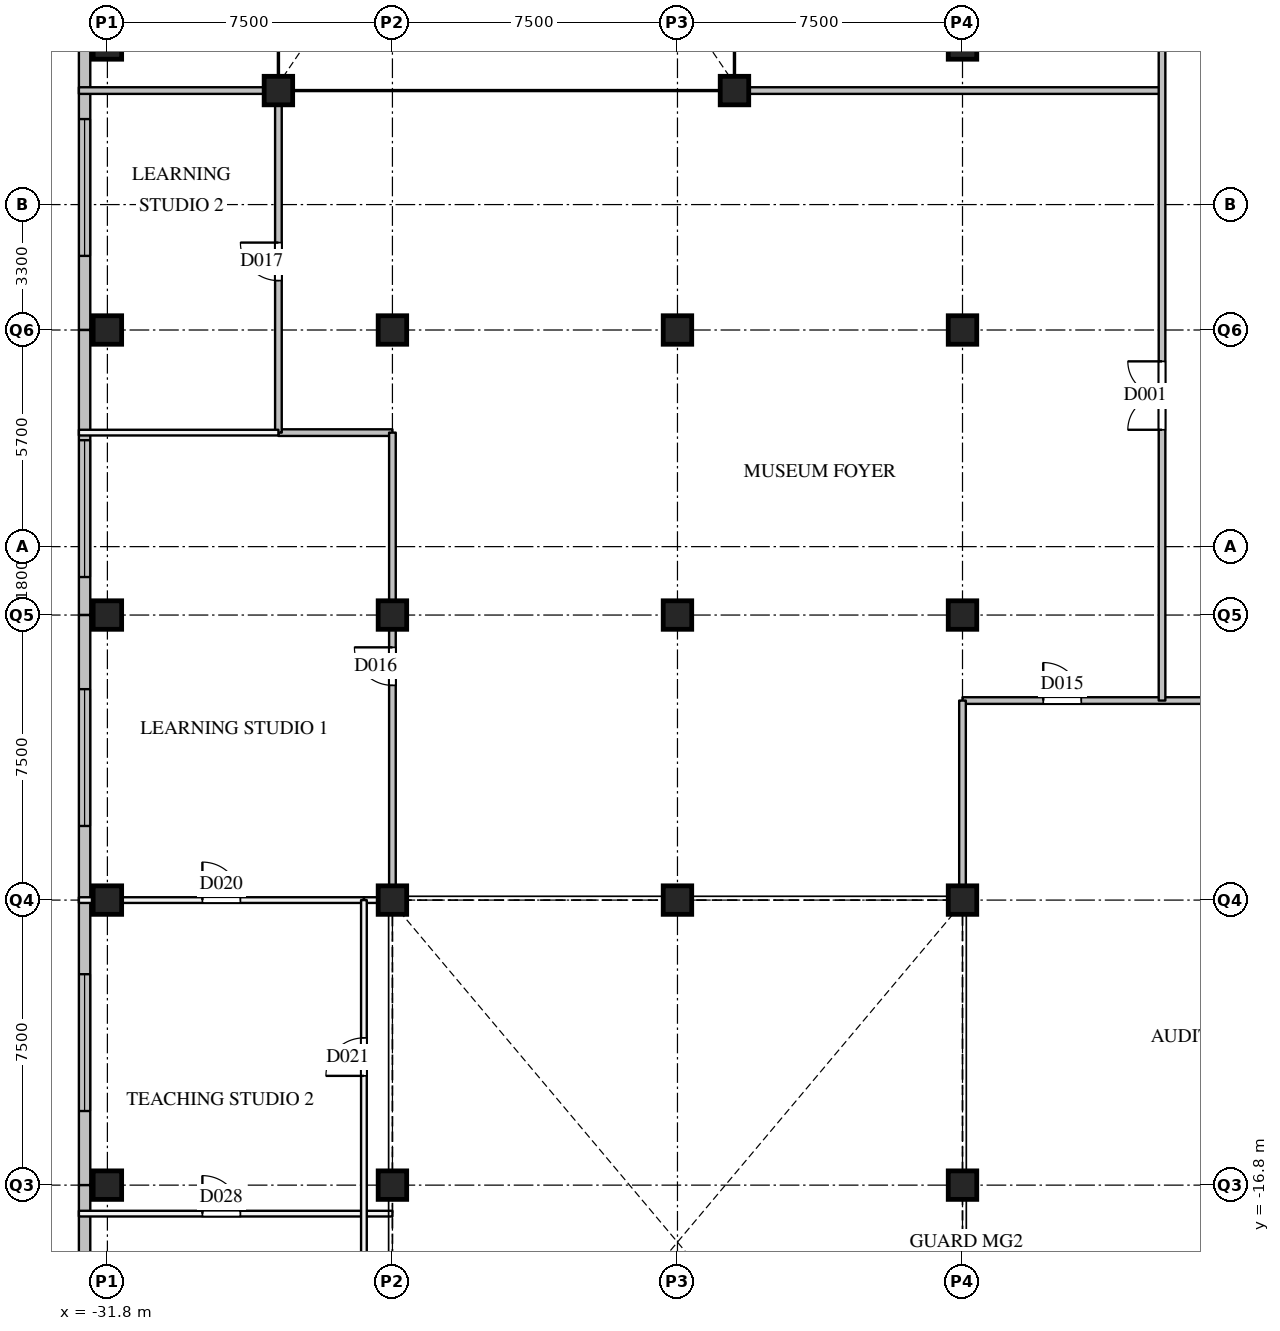
"""IFC4 building model, lengths in metres.
Left out: names, types, materials, properties, quantities, classifications, styles, units other than length and angle.
Written with IfcOpenShell. Run it as: python <this file> out.ifc"""

import sys

from ifc_helpers import new_model, si_unit, direction, frame, frame_2d, origin, origin_2d, place, context, subcontext, project, spatial, rectangle, extrude, element, fill, save


model = new_model("IFC4")
c1 = context("Model", 3, precision=1e-05, world=origin(), true_north=direction((0.0, 1.0)))
c2 = subcontext(c1, "Body", "Model", "MODEL_VIEW")
j1 = project(units=[si_unit("LENGTHUNIT", "METRE"), si_unit("PLANEANGLEUNIT", "RADIAN")], contexts=[c1])
p1 = place(None, origin())
s1 = spatial("IfcSite", under=j1, at=p1, CompositionType="ELEMENT")
p2 = place(p1, origin())
s2 = spatial("IfcBuilding", under=s1, at=p2, CompositionType="ELEMENT")
p3 = place(p2, frame((0.0, 0.0, 8.0)))
s3 = spatial("IfcBuildingStorey", under=s2, at=p3, CompositionType="ELEMENT", Elevation=8.0)
for number, where, z_axis, x_axis in (
    (1, (-31.8, -16.8, 0.0), (0.0, 0.0, 1.0), (1.0, 0.0, 0.0)),
    (2, (-31.8, -9.3, 0.0), (0.0, 0.0, 1.0), (1.0, 0.0, 0.0)),
    (3, (-31.8, -1.8, 0.0), (0.0, 0.0, 1.0), (1.0, 0.0, 0.0)),
    (4, (-31.8, 5.7, 0.0), (0.0, 0.0, 1.0), (1.0, 0.0, 0.0)),
    (5, (-31.8, 13.2, 0.0), (0.0, 0.0, 1.0), (1.0, 0.0, 0.0)),
    (6, (-24.3, -16.8, 0.0), (0.0, 0.0, 1.0), (1.0, 0.0, 0.0)),
    (7, (-24.3, -9.3, 0.0), (0.0, 0.0, 1.0), (1.0, 0.0, 0.0)),
    (8, (-24.3, -1.8, 0.0), (0.0, 0.0, 1.0), (1.0, 0.0, 0.0)),
    (9, (-24.3, 5.7, 0.0), (0.0, 0.0, 1.0), (1.0, 0.0, 0.0)),
    (10, (-16.8, -9.3, 0.0), (0.0, 0.0, 1.0), (1.0, 0.0, 0.0)),
    (11, (-16.8, -1.8, 0.0), (0.0, 0.0, 1.0), (1.0, 0.0, 0.0)),
    (12, (-16.8, 5.7, 0.0), (0.0, 0.0, 1.0), (1.0, 0.0, 0.0)),
    (13, (-9.3, -16.8, 0.0), (0.0, 0.0, 1.0), (1.0, 0.0, 0.0)),
    (14, (-9.3, -9.3, 0.0), (0.0, 0.0, 1.0), (1.0, 0.0, 0.0)),
    (15, (-9.3, -1.8, 0.0), (0.0, 0.0, 1.0), (1.0, 0.0, 0.0)),
    (16, (-9.3, 5.7, 0.0), (0.0, 0.0, 1.0), (1.0, 0.0, 0.0)),
    (17, (-9.3, 13.2, 0.0), (0.0, 0.0, 1.0), (1.0, 0.0, 0.0)),
    (18, (-27.3, 12.0, 0.0), (0.0, 0.0, 1.0), (1.0, 0.0, 0.0)),
    (19, (-15.3, 12.0, 0.0), (0.0, 0.0, 1.0), (1.0, 0.0, 0.0)),
):
    element("IfcColumn", number, at=place(p3, frame(where, z_axis=z_axis, x_axis=x_axis)), inside=s3, PredefinedType="COLUMN", context=c2, shape_type="SweptSolid", body=[
        extrude(rectangle(XDim=0.75, YDim=0.75, at=origin_2d()), origin(), (0.0, 0.0, 1.0), 6.0),
    ])
p4 = place(p3, frame((-32.4, 13.2, 0.0), z_axis=(0.0, 0.0, 1.0), x_axis=(0.0, -1.0, 0.0)))
e20 = element("IfcWall", 20, at=p4, inside=s3, PredefinedType="SOLIDWALL", context=c2, shape_type="SweptSolid", body=[
    extrude(rectangle(XDim=7.5, YDim=0.3, at=frame_2d((3.75, 0.0))), origin(), (0.0, 0.0, 1.0), 5.59),
])
p5 = place(p4, frame((1.95, 0.0, 2.4)))
e21 = element("IfcOpeningElement", 21, at=p5, cuts=e20, PredefinedType="OPENING", context=c2, shape_type="SweptSolid", body=[
    extrude(rectangle(XDim=3.6, YDim=1.2, at=frame_2d((1.8, 0.6))), frame((0.0, 0.16, 0.0), z_axis=(0.0, -1.0, 0.0), x_axis=(1.0, 0.0, 0.0)), (0.0, 0.0, 1.0), 0.32),
])
p6 = place(p3, frame((-32.4, 5.7, 0.0), z_axis=(0.0, 0.0, 1.0), x_axis=(0.0, -1.0, 0.0)))
e22 = element("IfcWall", 22, at=p6, inside=s3, PredefinedType="SOLIDWALL", context=c2, shape_type="SweptSolid", body=[
    extrude(rectangle(XDim=7.5, YDim=0.3, at=frame_2d((3.75, 0.0))), origin(), (0.0, 0.0, 1.0), 5.59),
])
p7 = place(p6, frame((2.9, 0.0, 2.4)))
e23 = element("IfcOpeningElement", 23, at=p7, cuts=e22, PredefinedType="OPENING", context=c2, shape_type="SweptSolid", body=[
    extrude(rectangle(XDim=3.6, YDim=1.2, at=frame_2d((1.8, 0.6))), frame((0.0, 0.16, 0.0), z_axis=(0.0, -1.0, 0.0), x_axis=(1.0, 0.0, 0.0)), (0.0, 0.0, 1.0), 0.32),
])
p8 = place(p3, frame((-32.4, -1.8, 0.0), z_axis=(0.0, 0.0, 1.0), x_axis=(0.0, -1.0, 0.0)))
e24 = element("IfcWall", 24, at=p8, inside=s3, PredefinedType="SOLIDWALL", context=c2, shape_type="SweptSolid", body=[
    extrude(rectangle(XDim=7.5, YDim=0.3, at=frame_2d((3.75, 0.0))), origin(), (0.0, 0.0, 1.0), 5.59),
])
p9 = place(p8, frame((1.95, 0.0, 2.4)))
e25 = element("IfcOpeningElement", 25, at=p9, cuts=e24, PredefinedType="OPENING", context=c2, shape_type="SweptSolid", body=[
    extrude(rectangle(XDim=3.6, YDim=1.2, at=frame_2d((1.8, 0.6))), frame((0.0, 0.16, 0.0), z_axis=(0.0, -1.0, 0.0), x_axis=(1.0, 0.0, 0.0)), (0.0, 0.0, 1.0), 0.32),
])
p10 = place(p3, frame((-32.4, -9.3, 0.0), z_axis=(0.0, 0.0, 1.0), x_axis=(0.0, -1.0, 0.0)))
e26 = element("IfcWall", 26, at=p10, inside=s3, PredefinedType="SOLIDWALL", context=c2, shape_type="SweptSolid", body=[
    extrude(rectangle(XDim=7.5, YDim=0.3, at=frame_2d((3.75, 0.0))), origin(), (0.0, 0.0, 1.0), 5.59),
])
p11 = place(p10, frame((1.95, 0.0, 2.4)))
e27 = element("IfcOpeningElement", 27, at=p11, cuts=e26, PredefinedType="OPENING", context=c2, shape_type="SweptSolid", body=[
    extrude(rectangle(XDim=3.6, YDim=1.2, at=frame_2d((1.8, 0.6))), frame((0.0, 0.16, 0.0), z_axis=(0.0, -1.0, 0.0), x_axis=(1.0, 0.0, 0.0)), (0.0, 0.0, 1.0), 0.32),
])
p12 = place(p3, frame((-32.4, -16.8, 0.0), z_axis=(0.0, 0.0, 1.0), x_axis=(0.0, -1.0, 0.0)))
e28 = element("IfcWall", 28, at=p12, inside=s3, PredefinedType="SOLIDWALL", context=c2, shape_type="SweptSolid", body=[
    extrude(rectangle(XDim=4.15, YDim=0.3, at=frame_2d((2.075, 0.0))), origin(), (0.0, 0.0, 1.0), 5.59),
])
p13 = place(p3, frame((-9.3, -4.05, 0.0), z_axis=(0.0, 0.0, 1.0), x_axis=(1.0, 0.0, 0.0)))
e29 = element("IfcWall", 29, at=p13, inside=s3, PredefinedType="PARTITIONING", context=c2, shape_type="SweptSolid", body=[
    extrude(rectangle(XDim=23.25, YDim=0.175, at=frame_2d((11.625, 0.0))), origin(), (0.0, 0.0, 1.0), 4.79),
])
p14 = place(p13, frame((17.375, 0.0, 0.0)))
e30 = element("IfcOpeningElement", 30, at=p14, cuts=e29, PredefinedType="OPENING", context=c2, shape_type="SweptSolid", body=[
    extrude(rectangle(XDim=1.8, YDim=2.1, at=frame_2d((0.9, 1.05))), frame((0.0, 0.097, 0.0), z_axis=(0.0, -1.0, 0.0), x_axis=(1.0, 0.0, 0.0)), (0.0, 0.0, 1.0), 0.195),
])
p15 = place(p13, frame((2.125, 0.0, 0.0)))
e31 = element("IfcOpeningElement", 31, at=p15, cuts=e29, PredefinedType="OPENING", context=c2, shape_type="SweptSolid", body=[
    extrude(rectangle(XDim=1.0, YDim=2.1, at=frame_2d((0.5, 1.05))), frame((0.0, 0.097, 0.0), z_axis=(0.0, -1.0, 0.0), x_axis=(1.0, 0.0, 0.0)), (0.0, 0.0, 1.0), 0.195),
])
p16 = place(p3, frame((-27.3, 3.0, 0.0), z_axis=(0.0, 0.0, 1.0), x_axis=(1.0, 0.0, 0.0)))
e32 = element("IfcWall", 32, at=p16, inside=s3, PredefinedType="PARTITIONING", context=c2, shape_type="SweptSolid", body=[
    extrude(rectangle(XDim=3.0, YDim=0.175, at=frame_2d((1.5, 0.0))), origin(), (0.0, 0.0, 1.0), 4.79),
])
p17 = place(p3, frame((-32.55, 12.0, 0.0), z_axis=(0.0, 0.0, 1.0), x_axis=(1.0, 0.0, 0.0)))
e33 = element("IfcWall", 33, at=p17, inside=s3, PredefinedType="PARTITIONING", context=c2, shape_type="SweptSolid", body=[
    extrude(rectangle(XDim=5.25, YDim=0.175, at=frame_2d((2.625, 0.0))), origin(), (0.0, 0.0, 1.0), 4.79),
])
p18 = place(p3, frame((-15.3, 12.0, 0.0), z_axis=(0.0, 0.0, 1.0), x_axis=(1.0, 0.0, 0.0)))
e34 = element("IfcWall", 34, at=p18, inside=s3, PredefinedType="PARTITIONING", context=c2, shape_type="SweptSolid", body=[
    extrude(rectangle(XDim=11.25, YDim=0.175, at=frame_2d((5.625, 0.0))), origin(), (0.0, 0.0, 1.0), 4.79),
])
p19 = place(p3, frame((-27.3, 3.0, 0.0), z_axis=(0.0, 0.0, 1.0), x_axis=(0.0, 1.0, 0.0)))
e35 = element("IfcWall", 35, at=p19, inside=s3, PredefinedType="PARTITIONING", context=c2, shape_type="SweptSolid", body=[
    extrude(rectangle(XDim=9.0, YDim=0.175, at=frame_2d((4.5, 0.0))), origin(), (0.0, 0.0, 1.0), 4.79),
])
p20 = place(p19, frame((4.0, 0.0, 0.0)))
e36 = element("IfcOpeningElement", 36, at=p20, cuts=e35, PredefinedType="OPENING", context=c2, shape_type="SweptSolid", body=[
    extrude(rectangle(XDim=1.0, YDim=2.1, at=frame_2d((0.5, 1.05))), frame((0.0, 0.097, 0.0), z_axis=(0.0, -1.0, 0.0), x_axis=(1.0, 0.0, 0.0)), (0.0, 0.0, 1.0), 0.195),
])
p21 = place(p3, frame((-24.3, -9.3, 0.0), z_axis=(0.0, 0.0, 1.0), x_axis=(0.0, 1.0, 0.0)))
e37 = element("IfcWall", 37, at=p21, inside=s3, PredefinedType="PARTITIONING", context=c2, shape_type="SweptSolid", body=[
    extrude(rectangle(XDim=12.3, YDim=0.175, at=frame_2d((6.15, 0.0))), origin(), (0.0, 0.0, 1.0), 4.79),
])
p22 = place(p21, frame((5.65, 0.0, 0.0)))
e38 = element("IfcOpeningElement", 38, at=p22, cuts=e37, PredefinedType="OPENING", context=c2, shape_type="SweptSolid", body=[
    extrude(rectangle(XDim=1.0, YDim=2.1, at=frame_2d((0.5, 1.05))), frame((0.0, 0.097, 0.0), z_axis=(0.0, -1.0, 0.0), x_axis=(1.0, 0.0, 0.0)), (0.0, 0.0, 1.0), 0.195),
])
p23 = place(p3, frame((-9.3, -9.3, 0.0), z_axis=(0.0, 0.0, 1.0), x_axis=(0.0, 1.0, 0.0)))
e39 = element("IfcWall", 39, at=p23, inside=s3, PredefinedType="PARTITIONING", context=c2, shape_type="SweptSolid", body=[
    extrude(rectangle(XDim=5.25, YDim=0.175, at=frame_2d((2.625, 0.0))), origin(), (0.0, 0.0, 1.0), 4.79),
])
p24 = place(p3, frame((-4.05, -4.05, 0.0), z_axis=(0.0, 0.0, 1.0), x_axis=(0.0, 1.0, 0.0)))
e40 = element("IfcWall", 40, at=p24, inside=s3, PredefinedType="PARTITIONING", context=c2, shape_type="SweptSolid", body=[
    extrude(rectangle(XDim=63.0, YDim=0.175, at=frame_2d((31.5, 0.0))), origin(), (0.0, 0.0, 1.0), 4.79),
])
p25 = place(p24, frame((7.125, 0.0, 0.0)))
e41 = element("IfcOpeningElement", 41, at=p25, cuts=e40, PredefinedType="OPENING", context=c2, shape_type="SweptSolid", body=[
    extrude(rectangle(XDim=1.8, YDim=2.1, at=frame_2d((0.9, 1.05))), frame((0.0, 0.097, 0.0), z_axis=(0.0, -1.0, 0.0), x_axis=(1.0, 0.0, 0.0)), (0.0, 0.0, 1.0), 0.195),
])
p26 = place(p24, frame((60.775, 0.0, 0.0)))
e42 = element("IfcOpeningElement", 42, at=p26, cuts=e40, PredefinedType="OPENING", context=c2, shape_type="SweptSolid", body=[
    extrude(rectangle(XDim=1.8, YDim=2.1, at=frame_2d((0.9, 1.05))), frame((0.0, 0.097, 0.0), z_axis=(0.0, -1.0, 0.0), x_axis=(1.0, 0.0, 0.0)), (0.0, 0.0, 1.0), 0.195),
])
p27 = place(p24, frame((22.65, 0.0, 0.0)))
e43 = element("IfcOpeningElement", 43, at=p27, cuts=e40, PredefinedType="OPENING", context=c2, shape_type="SweptSolid", body=[
    extrude(rectangle(XDim=1.8, YDim=2.1, at=frame_2d((0.9, 1.05))), frame((0.0, 0.097, 0.0), z_axis=(0.0, -1.0, 0.0), x_axis=(1.0, 0.0, 0.0)), (0.0, 0.0, 1.0), 0.195),
])
p28 = place(p24, frame((37.65, 0.0, 0.0)))
e44 = element("IfcOpeningElement", 44, at=p28, cuts=e40, PredefinedType="OPENING", context=c2, shape_type="SweptSolid", body=[
    extrude(rectangle(XDim=1.8, YDim=2.1, at=frame_2d((0.9, 1.05))), frame((0.0, 0.097, 0.0), z_axis=(0.0, -1.0, 0.0), x_axis=(1.0, 0.0, 0.0)), (0.0, 0.0, 1.0), 0.195),
])
p29 = place(p24, frame((52.3, 0.0, 0.0)))
e45 = element("IfcOpeningElement", 45, at=p29, cuts=e40, PredefinedType="OPENING", context=c2, shape_type="SweptSolid", body=[
    extrude(rectangle(XDim=1.8, YDim=2.1, at=frame_2d((0.9, 1.05))), frame((0.0, 0.097, 0.0), z_axis=(0.0, -1.0, 0.0), x_axis=(1.0, 0.0, 0.0)), (0.0, 0.0, 1.0), 0.195),
])
for number, where, z_axis, x_axis in (
    (46, (-25.05, -17.55, 0.0), (0.0, 0.0, 1.0), (1.0, 0.0, 0.0)),
    (47, (-25.05, -9.3, 0.0), (0.0, 0.0, 1.0), (1.0, 0.0, 0.0)),
):
    element("IfcWall", number, at=place(p3, frame(where, z_axis=z_axis, x_axis=x_axis)), inside=s3, PredefinedType="PARTITIONING", context=c2, shape_type="SweptSolid", body=[
        extrude(rectangle(XDim=0.75, YDim=0.15, at=frame_2d((0.375, 0.0))), origin(), (0.0, 0.0, 1.0), 4.79),
    ])
p30 = place(p3, frame((-32.55, 3.0, 0.0), z_axis=(0.0, 0.0, 1.0), x_axis=(1.0, 0.0, 0.0)))
e48 = element("IfcWall", 48, at=p30, inside=s3, PredefinedType="PARTITIONING", context=c2, shape_type="SweptSolid", body=[
    extrude(rectangle(XDim=5.25, YDim=0.15, at=frame_2d((2.625, 0.0))), origin(), (0.0, 0.0, 1.0), 4.79),
])
p31 = place(p3, frame((-32.55, -17.55, 0.0), z_axis=(0.0, 0.0, 1.0), x_axis=(1.0, 0.0, 0.0)))
e49 = element("IfcWall", 49, at=p31, inside=s3, PredefinedType="PARTITIONING", context=c2, shape_type="SweptSolid", body=[
    extrude(rectangle(XDim=7.5, YDim=0.15, at=frame_2d((3.75, 0.0))), origin(), (0.0, 0.0, 1.0), 4.79),
])
p32 = place(p31, frame((3.25, 0.0, 0.0)))
e50 = element("IfcOpeningElement", 50, at=p32, cuts=e49, PredefinedType="OPENING", context=c2, shape_type="SweptSolid", body=[
    extrude(rectangle(XDim=1.0, YDim=2.1, at=frame_2d((0.5, 1.05))), frame((0.0, 0.085, 0.0), z_axis=(0.0, -1.0, 0.0), x_axis=(1.0, 0.0, 0.0)), (0.0, 0.0, 1.0), 0.17),
])
p33 = place(p3, frame((-32.55, -9.3, 0.0), z_axis=(0.0, 0.0, 1.0), x_axis=(1.0, 0.0, 0.0)))
e51 = element("IfcWall", 51, at=p33, inside=s3, PredefinedType="PARTITIONING", context=c2, shape_type="SweptSolid", body=[
    extrude(rectangle(XDim=7.5, YDim=0.15, at=frame_2d((3.75, 0.0))), origin(), (0.0, 0.0, 1.0), 4.79),
])
p34 = place(p33, frame((3.25, 0.0, 0.0)))
e52 = element("IfcOpeningElement", 52, at=p34, cuts=e51, PredefinedType="OPENING", context=c2, shape_type="SweptSolid", body=[
    extrude(rectangle(XDim=1.0, YDim=2.1, at=frame_2d((0.5, 1.05))), frame((0.0, 0.085, 0.0), z_axis=(0.0, -1.0, 0.0), x_axis=(1.0, 0.0, 0.0)), (0.0, 0.0, 1.0), 0.17),
])
p35 = place(p3, frame((-25.05, -20.95, 0.0), z_axis=(0.0, 0.0, 1.0), x_axis=(0.0, 1.0, 0.0)))
e53 = element("IfcWall", 53, at=p35, inside=s3, PredefinedType="PARTITIONING", context=c2, shape_type="SweptSolid", body=[
    extrude(rectangle(XDim=11.65, YDim=0.15, at=frame_2d((5.825, 0.0))), origin(), (0.0, 0.0, 1.0), 4.79),
])
p36 = place(p35, frame((7.025, 0.0, 0.0)))
e54 = element("IfcOpeningElement", 54, at=p36, cuts=e53, PredefinedType="OPENING", context=c2, shape_type="SweptSolid", body=[
    extrude(rectangle(XDim=1.0, YDim=2.1, at=frame_2d((0.5, 1.05))), frame((0.0, 0.085, 0.0), z_axis=(0.0, -1.0, 0.0), x_axis=(1.0, 0.0, 0.0)), (0.0, 0.0, 1.0), 0.17),
])
p37 = place(p35, frame((1.2, 0.0, 0.0)))
e55 = element("IfcOpeningElement", 55, at=p37, cuts=e53, PredefinedType="OPENING", context=c2, shape_type="SweptSolid", body=[
    extrude(rectangle(XDim=1.0, YDim=2.1, at=frame_2d((0.5, 1.05))), frame((0.0, 0.085, 0.0), z_axis=(0.0, -1.0, 0.0), x_axis=(1.0, 0.0, 0.0)), (0.0, 0.0, 1.0), 0.17),
])
p38 = place(p5, origin())
e56 = element("IfcWindow", 56, at=p38, inside=s3, PartitioningType="SINGLE_PANEL", PredefinedType="WINDOW", context=c2, shape_type="SweptSolid", body=[
    extrude(rectangle(XDim=3.6, YDim=1.2, at=frame_2d((1.8, 0.6))), frame((0.0, 0.03, 0.0), z_axis=(0.0, -1.0, 0.0), x_axis=(1.0, 0.0, 0.0)), (0.0, 0.0, 1.0), 0.06),
])
fill(e21, e56)
p39 = place(p7, origin())
e57 = element("IfcWindow", 57, at=p39, inside=s3, PartitioningType="SINGLE_PANEL", PredefinedType="WINDOW", context=c2, shape_type="SweptSolid", body=[
    extrude(rectangle(XDim=3.6, YDim=1.2, at=frame_2d((1.8, 0.6))), frame((0.0, 0.03, 0.0), z_axis=(0.0, -1.0, 0.0), x_axis=(1.0, 0.0, 0.0)), (0.0, 0.0, 1.0), 0.06),
])
fill(e23, e57)
p40 = place(p9, origin())
e58 = element("IfcWindow", 58, at=p40, inside=s3, PartitioningType="SINGLE_PANEL", PredefinedType="WINDOW", context=c2, shape_type="SweptSolid", body=[
    extrude(rectangle(XDim=3.6, YDim=1.2, at=frame_2d((1.8, 0.6))), frame((0.0, 0.03, 0.0), z_axis=(0.0, -1.0, 0.0), x_axis=(1.0, 0.0, 0.0)), (0.0, 0.0, 1.0), 0.06),
])
fill(e25, e58)
p41 = place(p11, origin())
e59 = element("IfcWindow", 59, at=p41, inside=s3, PartitioningType="SINGLE_PANEL", PredefinedType="WINDOW", context=c2, shape_type="SweptSolid", body=[
    extrude(rectangle(XDim=3.6, YDim=1.2, at=frame_2d((1.8, 0.6))), frame((0.0, 0.03, 0.0), z_axis=(0.0, -1.0, 0.0), x_axis=(1.0, 0.0, 0.0)), (0.0, 0.0, 1.0), 0.06),
])
fill(e27, e59)
p42 = place(p25, origin())
e60 = element("IfcDoor", 60, at=p42, inside=s3, OperationType="DOUBLE_DOOR_SINGLE_SWING", PredefinedType="DOOR", context=c2, shape_type="SweptSolid", body=[
    extrude(rectangle(XDim=1.8, YDim=2.1, at=frame_2d((0.9, 1.05))), frame((0.0, 0.025, 0.0), z_axis=(0.0, -1.0, 0.0), x_axis=(1.0, 0.0, 0.0)), (0.0, 0.0, 1.0), 0.05),
])
fill(e41, e60)
p43 = place(p15, origin())
e61 = element("IfcDoor", 61, at=p43, inside=s3, OperationType="SINGLE_SWING_LEFT", PredefinedType="DOOR", context=c2, shape_type="SweptSolid", body=[
    extrude(rectangle(XDim=1.0, YDim=2.1, at=frame_2d((0.5, 1.05))), frame((0.0, 0.025, 0.0), z_axis=(0.0, -1.0, 0.0), x_axis=(1.0, 0.0, 0.0)), (0.0, 0.0, 1.0), 0.05),
])
fill(e31, e61)
p44 = place(p22, origin())
e62 = element("IfcDoor", 62, at=p44, inside=s3, OperationType="SINGLE_SWING_RIGHT", PredefinedType="DOOR", context=c2, shape_type="SweptSolid", body=[
    extrude(rectangle(XDim=1.0, YDim=2.1, at=frame_2d((0.5, 1.05))), frame((0.0, 0.025, 0.0), z_axis=(0.0, -1.0, 0.0), x_axis=(1.0, 0.0, 0.0)), (0.0, 0.0, 1.0), 0.05),
])
fill(e38, e62)
p45 = place(p20, origin())
e63 = element("IfcDoor", 63, at=p45, inside=s3, OperationType="SINGLE_SWING_RIGHT", PredefinedType="DOOR", context=c2, shape_type="SweptSolid", body=[
    extrude(rectangle(XDim=1.0, YDim=2.1, at=frame_2d((0.5, 1.05))), frame((0.0, 0.025, 0.0), z_axis=(0.0, -1.0, 0.0), x_axis=(1.0, 0.0, 0.0)), (0.0, 0.0, 1.0), 0.05),
])
fill(e36, e63)
p46 = place(p34, origin())
e64 = element("IfcDoor", 64, at=p46, inside=s3, OperationType="SINGLE_SWING_LEFT", PredefinedType="DOOR", context=c2, shape_type="SweptSolid", body=[
    extrude(rectangle(XDim=1.0, YDim=2.1, at=frame_2d((0.5, 1.05))), frame((0.0, 0.025, 0.0), z_axis=(0.0, -1.0, 0.0), x_axis=(1.0, 0.0, 0.0)), (0.0, 0.0, 1.0), 0.05),
])
fill(e52, e64)
p47 = place(p36, origin())
e65 = element("IfcDoor", 65, at=p47, inside=s3, OperationType="SINGLE_SWING_LEFT", PredefinedType="DOOR", context=c2, shape_type="SweptSolid", body=[
    extrude(rectangle(XDim=1.0, YDim=2.1, at=frame_2d((0.5, 1.05))), frame((0.0, 0.025, 0.0), z_axis=(0.0, -1.0, 0.0), x_axis=(1.0, 0.0, 0.0)), (0.0, 0.0, 1.0), 0.05),
])
fill(e54, e65)
p48 = place(p32, origin())
e66 = element("IfcDoor", 66, at=p48, inside=s3, OperationType="SINGLE_SWING_LEFT", PredefinedType="DOOR", context=c2, shape_type="SweptSolid", body=[
    extrude(rectangle(XDim=1.0, YDim=2.1, at=frame_2d((0.5, 1.05))), frame((0.0, 0.025, 0.0), z_axis=(0.0, -1.0, 0.0), x_axis=(1.0, 0.0, 0.0)), (0.0, 0.0, 1.0), 0.05),
])
fill(e50, e66)
save(model, sys.argv[1])
